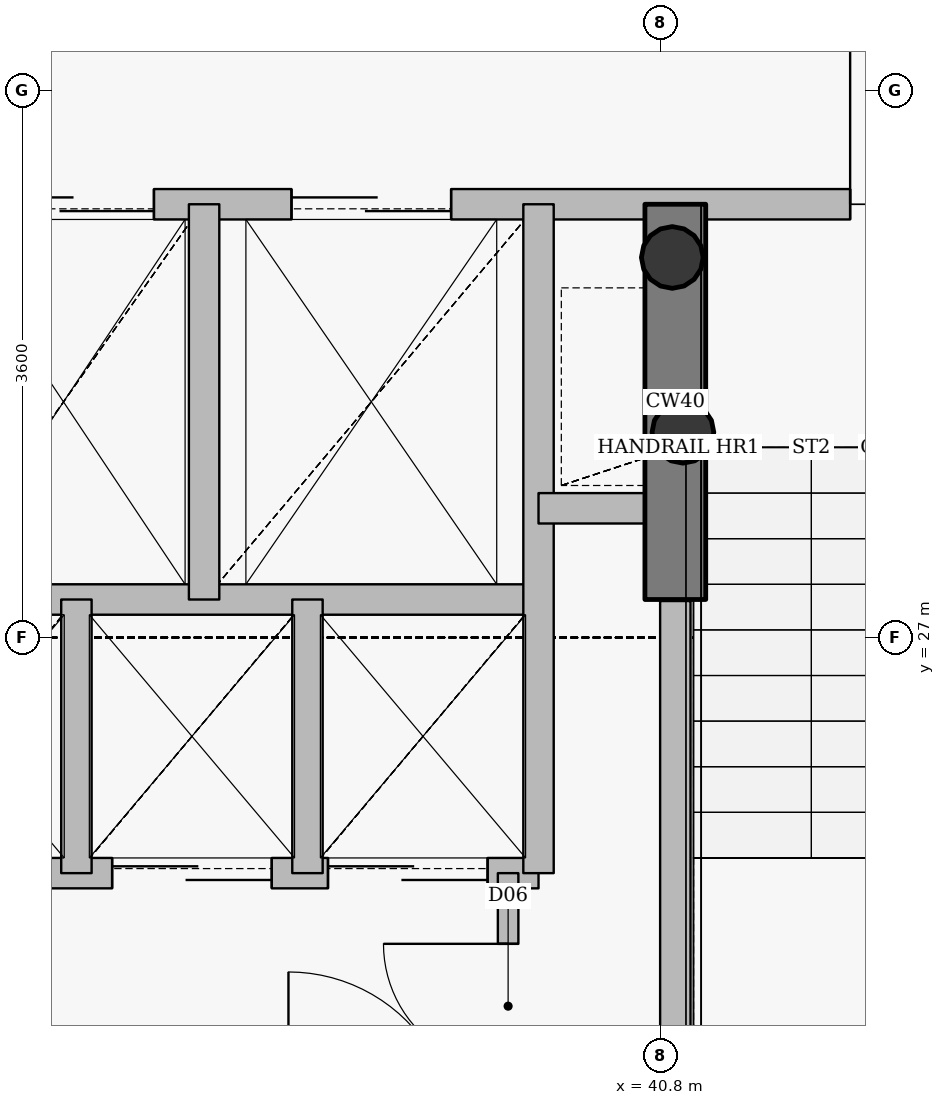
"""IFC4 building model, lengths in metres.
Left out: names, types, materials, properties, quantities, classifications, styles, units other than length and angle.
Written with IfcOpenShell. Run it as: python <this file> out.ifc"""

import sys

from ifc_helpers import new_model, si_unit, direction, frame, frame_2d, origin, origin_2d, place, context, subcontext, project, spatial, rectangle, hollow_circle, extrude, source, transform, mapped, element, fill, save


model = new_model("IFC4")
c1 = context("Model", 3, precision=1e-05, world=origin(), true_north=direction((0.0, 1.0)))
c2 = subcontext(c1, "Body", "Model", "MODEL_VIEW")
j1 = project(units=[si_unit("LENGTHUNIT", "METRE"), si_unit("PLANEANGLEUNIT", "RADIAN")], contexts=[c1])
p1 = place(None, origin())
s1 = spatial("IfcSite", under=j1, at=p1, CompositionType="ELEMENT")
p2 = place(p1, origin())
s2 = spatial("IfcBuilding", under=s1, at=p2, CompositionType="ELEMENT")
p3 = place(p2, frame((0.0, 0.0, 318.0)))
s3 = spatial("IfcBuildingStorey", under=s2, at=p3, CompositionType="ELEMENT", Elevation=318.0)
for number, where, z_axis, x_axis in (
    (1, (40.95, 28.35, 0.0), (0.0, 0.0, 1.0), (1.0, 0.0, 0.0)),
    (2, (40.88, 29.5, 0.0), (0.0, 0.0, 1.0), (1.0, 0.0, 0.0)),
):
    element("IfcColumn", number, at=place(p3, frame(where, z_axis=z_axis, x_axis=x_axis)), inside=s3, PredefinedType="COLUMN", context=c2, shape_type="SweptSolid", body=[
        extrude(hollow_circle(Radius=0.203, WallThickness=0.016, at=origin_2d()), origin(), (0.0, 0.0, 1.0), 6.0),
    ])
p4 = place(p3, frame((40.9, 27.25, 0.0), z_axis=(0.0, 0.0, 1.0), x_axis=(0.0, 1.0, 0.0)))
e3 = element("IfcWall", 3, at=p4, inside=s3, PredefinedType="SHEAR", context=c2, shape_type="SweptSolid", body=[
    extrude(rectangle(XDim=2.6, YDim=0.4, at=frame_2d((1.3, 0.0))), origin(), (0.0, 0.0, 1.0), 5.35),
])
p5 = place(p3, frame((35.05, 27.25, 0.0), z_axis=(0.0, 0.0, 1.0), x_axis=(1.0, 0.0, 0.0)))
e4 = element("IfcWall", 4, at=p5, inside=s3, PredefinedType="PARTITIONING", context=c2, shape_type="SweptSolid", body=[
    extrude(rectangle(XDim=4.95, YDim=0.2, at=frame_2d((2.475, 0.0))), origin(), (0.0, 0.0, 1.0), 5.335),
])
p6 = place(p3, frame((35.45, 25.45, 0.0), z_axis=(0.0, 0.0, 1.0), x_axis=(1.0, 0.0, 0.0)))
e5 = element("IfcWall", 5, at=p6, inside=s3, PredefinedType="PARTITIONING", context=c2, shape_type="SweptSolid", body=[
    extrude(rectangle(XDim=4.55, YDim=0.2, at=frame_2d((2.275, 0.0))), origin(), (0.0, 0.0, 1.0), 5.335),
])
p7 = place(p6, frame((0.25, 0.0, 0.0)))
e6 = element("IfcOpeningElement", 6, at=p7, cuts=e5, PredefinedType="OPENING", context=c2, shape_type="SweptSolid", body=[
    extrude(rectangle(XDim=1.05, YDim=2.15, at=origin_2d()), frame((0.525, 0.11, 1.075), z_axis=(0.0, -1.0, 0.0), x_axis=(1.0, 0.0, 0.0)), (0.0, 0.0, 1.0), 0.22),
])
p8 = place(p6, frame((1.745, 0.0, 0.0)))
e7 = element("IfcOpeningElement", 7, at=p8, cuts=e5, PredefinedType="OPENING", context=c2, shape_type="SweptSolid", body=[
    extrude(rectangle(XDim=1.05, YDim=2.15, at=origin_2d()), frame((0.525, 0.11, 1.075), z_axis=(0.0, -1.0, 0.0), x_axis=(1.0, 0.0, 0.0)), (0.0, 0.0, 1.0), 0.22),
])
p9 = place(p6, frame((3.165, 0.0, 0.0)))
e8 = element("IfcOpeningElement", 8, at=p9, cuts=e5, PredefinedType="OPENING", context=c2, shape_type="SweptSolid", body=[
    extrude(rectangle(XDim=1.05, YDim=2.15, at=origin_2d()), frame((0.525, 0.11, 1.075), z_axis=(0.0, -1.0, 0.0), x_axis=(1.0, 0.0, 0.0)), (0.0, 0.0, 1.0), 0.22),
])
p10 = place(p3, frame((35.95, 29.85, 0.0), z_axis=(0.0, 0.0, 1.0), x_axis=(1.0, 0.0, 0.0)))
e9 = element("IfcWall", 9, at=p10, inside=s3, PredefinedType="PARTITIONING", context=c2, shape_type="SweptSolid", body=[
    extrude(rectangle(XDim=8.49, YDim=0.2, at=frame_2d((4.245, 0.0))), origin(), (0.0, 0.0, 1.0), 5.335),
])
p11 = place(p10, frame((6.1, 0.0, 0.0)))
e10 = element("IfcOpeningElement", 10, at=p11, cuts=e9, PredefinedType="OPENING", context=c2, shape_type="SweptSolid", body=[
    extrude(rectangle(XDim=1.2, YDim=2.15, at=origin_2d()), frame((0.6, 0.11, 1.075), z_axis=(0.0, -1.0, 0.0), x_axis=(1.0, 0.0, 0.0)), (0.0, 0.0, 1.0), 0.22),
])
p12 = place(p10, frame((0.37, 0.0, 0.0)))
e11 = element("IfcOpeningElement", 11, at=p12, cuts=e9, PredefinedType="OPENING", context=c2, shape_type="SweptSolid", body=[
    extrude(rectangle(XDim=1.15, YDim=2.15, at=origin_2d()), frame((0.575, 0.11, 1.075), z_axis=(0.0, -1.0, 0.0), x_axis=(1.0, 0.0, 0.0)), (0.0, 0.0, 1.0), 0.22),
])
p13 = place(p10, frame((2.425, 0.0, 0.0)))
e12 = element("IfcOpeningElement", 12, at=p13, cuts=e9, PredefinedType="OPENING", context=c2, shape_type="SweptSolid", body=[
    extrude(rectangle(XDim=1.05, YDim=2.15, at=origin_2d()), frame((0.525, 0.11, 1.075), z_axis=(0.0, -1.0, 0.0), x_axis=(1.0, 0.0, 0.0)), (0.0, 0.0, 1.0), 0.22),
])
p14 = place(p3, frame((36.96, 25.45, 0.0), z_axis=(0.0, 0.0, 1.0), x_axis=(0.0, 1.0, 0.0)))
e13 = element("IfcWall", 13, at=p14, inside=s3, PredefinedType="PARTITIONING", context=c2, shape_type="SweptSolid", body=[
    extrude(rectangle(XDim=1.8, YDim=0.2, at=frame_2d((0.9, 0.0))), origin(), (0.0, 0.0, 1.0), 5.75),
])
p15 = place(p3, frame((37.8, 27.25, 0.0), z_axis=(0.0, 0.0, 1.0), x_axis=(0.0, 1.0, 0.0)))
e14 = element("IfcWall", 14, at=p15, inside=s3, PredefinedType="PARTITIONING", context=c2, shape_type="SweptSolid", body=[
    extrude(rectangle(XDim=2.6, YDim=0.2, at=frame_2d((1.3, 0.0))), origin(), (0.0, 0.0, 1.0), 5.75),
])
p16 = place(p3, frame((38.48, 25.45, 0.0), z_axis=(0.0, 0.0, 1.0), x_axis=(0.0, 1.0, 0.0)))
e15 = element("IfcWall", 15, at=p16, inside=s3, PredefinedType="PARTITIONING", context=c2, shape_type="SweptSolid", body=[
    extrude(rectangle(XDim=1.8, YDim=0.2, at=frame_2d((0.9, 0.0))), origin(), (0.0, 0.0, 1.0), 5.75),
])
p17 = place(p3, frame((39.8, 23.7, 0.0), z_axis=(0.0, 0.0, 1.0), x_axis=(0.0, 1.0, 0.0)))
e16 = element("IfcWall", 16, at=p17, inside=s3, PredefinedType="PARTITIONING", context=c2, shape_type="SweptSolid", body=[
    extrude(rectangle(XDim=1.75, YDim=0.135, at=frame_2d((0.875, 0.0))), origin(), (0.0, 0.0, 1.0), 5.75),
])
p18 = place(p17, frame((0.465, 0.0, 0.0)))
e17 = element("IfcOpeningElement", 17, at=p18, cuts=e16, PredefinedType="OPENING", context=c2, shape_type="SweptSolid", body=[
    extrude(rectangle(XDim=0.82, YDim=2.1, at=origin_2d()), frame((0.41, 0.078, 1.05), z_axis=(0.0, -1.0, 0.0), x_axis=(1.0, 0.0, 0.0)), (0.0, 0.0, 1.0), 0.155),
])
p19 = place(p3, frame((40.0, 25.45, 0.0), z_axis=(0.0, 0.0, 1.0), x_axis=(0.0, 1.0, 0.0)))
e18 = element("IfcWall", 18, at=p19, inside=s3, PredefinedType="PARTITIONING", context=c2, shape_type="SweptSolid", body=[
    extrude(rectangle(XDim=4.4, YDim=0.2, at=frame_2d((2.2, 0.0))), origin(), (0.0, 0.0, 1.0), 5.75),
])
p20 = place(p3, frame((40.0, 27.85, 0.0), z_axis=(0.0, 0.0, 1.0), x_axis=(1.0, 0.0, 0.0)))
e19 = element("IfcWall", 19, at=p20, inside=s3, PredefinedType="PARTITIONING", context=c2, shape_type="SweptSolid", body=[
    extrude(rectangle(XDim=0.9, YDim=0.2, at=frame_2d((0.45, 0.0))), origin(), (0.0, 0.0, 1.0), 5.75),
])
p21 = place(p3, frame((40.9, 21.33, 0.0), z_axis=(0.0, 0.0, 1.0), x_axis=(0.0, 1.0, 0.0)))
e20 = element("IfcWall", 20, at=p21, inside=s3, PredefinedType="PARTITIONING", context=c2, shape_type="SweptSolid", body=[
    extrude(rectangle(XDim=5.91, YDim=0.2, at=frame_2d((2.955, 0.0))), origin(), (0.0, 0.0, 1.0), 5.285),
])
m1 = source(origin(), c2, "Body", "SweptSolid", [
    extrude(rectangle(XDim=1.2, YDim=2.15, at=origin_2d()), frame((0.6, 0.025, 1.075), z_axis=(0.0, -1.0, 0.0), x_axis=(1.0, 0.0, 0.0)), (0.0, 0.0, 1.0), 0.05),
])
p22 = place(p11, origin())
e21 = element("IfcDoor", 21, at=p22, inside=s3, OperationType="SINGLE_SWING_LEFT", PredefinedType="DOOR", context=c2, shape_type="MappedRepresentation", body=[
    mapped(m1, transform((0.0, 0.0, 0.0), x_axis=(1.0, 0.0, 0.0), y_axis=(0.0, 1.0, 0.0), z_axis=(0.0, 0.0, 1.0), scale=1.0)),
])
fill(e10, e21)
m2 = source(origin(), c2, "Body", "SweptSolid", [
    extrude(rectangle(XDim=1.15, YDim=2.15, at=origin_2d()), frame((0.575, 0.025, 1.075), z_axis=(0.0, -1.0, 0.0), x_axis=(1.0, 0.0, 0.0)), (0.0, 0.0, 1.0), 0.05),
])
p23 = place(p12, origin())
e22 = element("IfcDoor", 22, at=p23, inside=s3, OperationType="DOUBLE_DOOR_SLIDING", PredefinedType="USERDEFINED", context=c2, shape_type="MappedRepresentation", body=[
    mapped(m2, transform((0.0, 0.0, 0.0), x_axis=(1.0, 0.0, 0.0), y_axis=(0.0, 1.0, 0.0), z_axis=(0.0, 0.0, 1.0), scale=1.0)),
])
fill(e11, e22)
m3 = source(origin(), c2, "Body", "SweptSolid", [
    extrude(rectangle(XDim=1.05, YDim=2.15, at=origin_2d()), frame((0.525, 0.025, 1.075), z_axis=(0.0, -1.0, 0.0), x_axis=(1.0, 0.0, 0.0)), (0.0, 0.0, 1.0), 0.05),
])
p24 = place(p13, origin())
e23 = element("IfcDoor", 23, at=p24, inside=s3, OperationType="DOUBLE_DOOR_SLIDING", PredefinedType="USERDEFINED", context=c2, shape_type="MappedRepresentation", body=[
    mapped(m3, transform((0.0, 0.0, 0.0), x_axis=(1.0, 0.0, 0.0), y_axis=(0.0, 1.0, 0.0), z_axis=(0.0, 0.0, 1.0), scale=1.0)),
])
fill(e12, e23)
p25 = place(p8, origin())
e24 = element("IfcDoor", 24, at=p25, inside=s3, OperationType="DOUBLE_DOOR_SLIDING", PredefinedType="USERDEFINED", context=c2, shape_type="MappedRepresentation", body=[
    mapped(m3, transform((0.0, 0.0, 0.0), x_axis=(1.0, 0.0, 0.0), y_axis=(0.0, 1.0, 0.0), z_axis=(0.0, 0.0, 1.0), scale=1.0)),
])
fill(e7, e24)
p26 = place(p9, origin())
e25 = element("IfcDoor", 25, at=p26, inside=s3, OperationType="DOUBLE_DOOR_SLIDING", PredefinedType="USERDEFINED", context=c2, shape_type="MappedRepresentation", body=[
    mapped(m3, transform((0.0, 0.0, 0.0), x_axis=(1.0, 0.0, 0.0), y_axis=(0.0, 1.0, 0.0), z_axis=(0.0, 0.0, 1.0), scale=1.0)),
])
fill(e8, e25)
m4 = source(origin(), c2, "Body", "SweptSolid", [
    extrude(rectangle(XDim=0.82, YDim=2.1, at=origin_2d()), frame((0.41, 0.025, 1.05), z_axis=(0.0, -1.0, 0.0), x_axis=(1.0, 0.0, 0.0)), (0.0, 0.0, 1.0), 0.05),
])
p27 = place(p18, origin())
e26 = element("IfcDoor", 26, at=p27, inside=s3, OperationType="SINGLE_SWING_RIGHT", PredefinedType="DOOR", context=c2, shape_type="MappedRepresentation", body=[
    mapped(m4, transform((0.0, 0.0, 0.0), x_axis=(1.0, 0.0, 0.0), y_axis=(0.0, 1.0, 0.0), z_axis=(0.0, 0.0, 1.0), scale=1.0)),
])
fill(e17, e26)
save(model, sys.argv[1])
